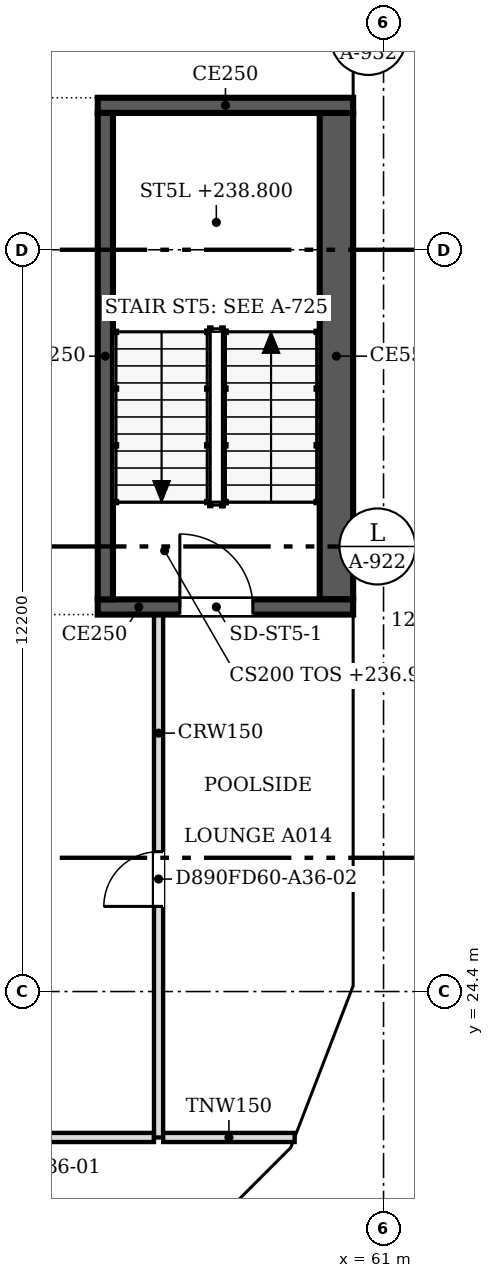
"""IFC4 building model, lengths in metres.
Left out: names, types, materials, properties, quantities, classifications, styles, units other than length and angle.
Written with IfcOpenShell. Run it as: python <this file> out.ifc"""

import sys

from ifc_helpers import new_model, si_unit, direction, frame, frame_2d, origin, place, context, subcontext, project, spatial, polyline, rectangle, outline, extrude, faceted_brep, source, transform, mapped, element, fill, save


model = new_model("IFC4")
c1 = context("Model", 3, precision=1e-05, world=origin(), true_north=direction((0.0, 1.0)))
c2 = subcontext(c1, "Body", "Model", "MODEL_VIEW")
j1 = project(units=[si_unit("LENGTHUNIT", "METRE"), si_unit("PLANEANGLEUNIT", "RADIAN")], contexts=[c1])
p1 = place(None, origin())
s1 = spatial("IfcSite", under=j1, at=p1, CompositionType="ELEMENT")
p2 = place(p1, origin())
s2 = spatial("IfcBuilding", under=s1, at=p2, CompositionType="ELEMENT")
p3 = place(p2, frame((0.0, 0.0, 236.9)))
s3 = spatial("IfcBuildingStorey", under=s2, at=p3, CompositionType="ELEMENT", Elevation=236.9)
m1 = source(origin(), c2, "Body", "Brep", [
    faceted_brep([(2.997, -0.25, 3.732), (2.944, -0.25, 3.8), (0.0, -0.25, 0.0), (2.997, -0.25, 0.0), (0.053, 0.25, 0.068), (2.891, 0.25, 3.732), (2.891, 0.25, 0.0), (0.053, 0.25, 0.0), (2.944, 0.0, 3.8), (0.0, 0.0, 0.0)], [[[0, 1, 2, 3]], [[4, 5, 6, 7]], [[8, 1, 0]], [[5, 4, 9, 2, 1, 8]], [[7, 6, 3, 2, 9]], [[7, 9, 4]], [[3, 6, 5, 8, 0]]]),
])
p4 = place(p3, frame((57.606, 19.612, 0.0), z_axis=(0.0, 0.0, 1.0), x_axis=(0.707106781187, 0.707106781187, 0.0)))
e1 = element("IfcWall", 1, at=p4, inside=s3, PredefinedType="SOLIDWALL", context=c2, shape_type="MappedRepresentation", body=[
    mapped(m1, transform((0.0, 0.0, 0.0), scale=1.0)),
])
m2 = source(origin(), c2, "Body", "SweptSolid", [
    extrude(outline(polyline([(2.744, 3.134), (0.51, 0.25), (2.744, 0.25), (2.744, 3.134)])), frame((0.0, 0.26, 0.0), z_axis=(0.0, -1.0, 0.0), x_axis=(1.0, 0.0, 0.0)), (0.0, 0.0, 1.0), 0.52),
])
p5 = place(p4, origin())
e2 = element("IfcOpeningElement", 2, at=p5, cuts=e1, PredefinedType="OPENING", context=c2, shape_type="MappedRepresentation", body=[
    mapped(m2, transform((0.0, 0.0, 0.0), scale=1.0)),
])
m3 = source(origin(), c2, "Body", "Brep", [
    faceted_brep([(3.003, -0.25, 0.0), (0.053, -0.25, 3.8), (0.0, -0.25, 3.732), (0.0, -0.25, 0.0), (0.106, 0.25, 3.732), (2.957, 0.25, 0.06), (2.957, 0.25, 0.0), (0.106, 0.25, 0.0), (0.053, 0.0, 3.8), (3.003, 0.0, 0.0)], [[[0, 1, 2, 3]], [[4, 5, 6, 7]], [[5, 4, 8, 1, 0, 9]], [[2, 1, 8]], [[7, 6, 9, 0, 3]], [[7, 3, 2, 8, 4]], [[9, 6, 5]]]),
])
p6 = place(p3, frame((59.669, 21.644, 0.0), z_axis=(0.0, 0.0, 1.0), x_axis=(0.35992665181, 0.932980602862, 0.0)))
e3 = element("IfcWall", 3, at=p6, inside=s3, PredefinedType="SOLIDWALL", context=c2, shape_type="MappedRepresentation", body=[
    mapped(m3, transform((0.0, 0.0, 0.0), scale=1.0)),
])
m4 = source(origin(), c2, "Body", "SweptSolid", [
    extrude(outline(polyline([(2.493, 0.25), (0.253, 3.135), (0.253, 0.25), (2.493, 0.25)])), frame((0.0, 0.26, 0.0), z_axis=(0.0, -1.0, 0.0), x_axis=(1.0, 0.0, 0.0)), (0.0, 0.0, 1.0), 0.52),
])
p7 = place(p6, origin())
e4 = element("IfcOpeningElement", 4, at=p7, cuts=e3, PredefinedType="OPENING", context=c2, shape_type="MappedRepresentation", body=[
    mapped(m4, transform((0.0, 0.0, 0.0), scale=1.0)),
])
m5 = source(origin(), c2, "Body", "Brep", [
    faceted_brep([(6.053, -0.25, 0.0), (3.003, -0.25, 3.8), (0.0, -0.25, 0.0), (0.047, 0.25, 0.059), (3.003, 0.25, 3.8), (6.053, 0.25, 0.0), (0.047, 0.25, 0.0), (0.0, 0.0, 0.0)], [[[0, 1, 2]], [[3, 4, 5, 6]], [[5, 4, 1, 0]], [[4, 3, 7, 2, 1]], [[6, 5, 0, 2, 7]], [[6, 7, 3]]]),
])
p8 = place(p3, frame((60.75, 24.447, 0.0), z_axis=(0.0, 0.0, 1.0), x_axis=(0.0, 1.0, 0.0)))
e5 = element("IfcWall", 5, at=p8, inside=s3, PredefinedType="SOLIDWALL", context=c2, shape_type="MappedRepresentation", body=[
    mapped(m5, transform((0.0, 0.0, 0.0), scale=1.0)),
])
m6 = source(origin(), c2, "Body", "SweptSolid", [
    extrude(outline(polyline([(5.532, 0.25), (3.005, 3.399), (0.516, 0.25), (5.532, 0.25)])), frame((0.0, 0.26, 0.0), z_axis=(0.0, -1.0, 0.0), x_axis=(1.0, 0.0, 0.0)), (0.0, 0.0, 1.0), 0.52),
])
p9 = place(p8, origin())
e6 = element("IfcOpeningElement", 6, at=p9, cuts=e5, PredefinedType="OPENING", context=c2, shape_type="MappedRepresentation", body=[
    mapped(m6, transform((0.0, 0.0, 0.0), scale=1.0)),
])
m7 = source(origin(), c2, "Body", "SweptSolid", [
    extrude(outline(polyline([(6.1, 0.0), (3.05, 3.8), (0.0, 0.0), (6.1, 0.0)])), frame((0.0, 0.25, 0.0), z_axis=(0.0, -1.0, 0.0), x_axis=(1.0, 0.0, 0.0)), (0.0, 0.0, 1.0), 0.5),
])
p10 = place(p3, frame((60.75, 30.5, 0.0), z_axis=(0.0, 0.0, 1.0), x_axis=(0.0, 1.0, 0.0)))
e7 = element("IfcWall", 7, at=p10, inside=s3, PredefinedType="SOLIDWALL", context=c2, shape_type="MappedRepresentation", body=[
    mapped(m7, transform((0.0, 0.0, 0.0), scale=1.0)),
])
m8 = source(origin(), c2, "Body", "SweptSolid", [
    extrude(outline(polyline([(5.579, 0.25), (3.05, 3.401), (0.521, 0.25), (5.579, 0.25)])), frame((0.0, 0.26, 0.0), z_axis=(0.0, -1.0, 0.0), x_axis=(1.0, 0.0, 0.0)), (0.0, 0.0, 1.0), 0.52),
])
p11 = place(p10, origin())
e8 = element("IfcOpeningElement", 8, at=p11, cuts=e7, PredefinedType="OPENING", context=c2, shape_type="MappedRepresentation", body=[
    mapped(m8, transform((0.0, 0.0, 0.0), scale=1.0)),
])
m9 = source(origin(), c2, "Body", "Brep", [
    faceted_brep([(6.1, -0.25, 0.0), (3.05, -0.25, 3.8), (0.0, -0.25, 0.0), (6.1, -0.25, 0.0), (0.0, 0.25, 0.0), (3.05, 0.25, 3.8), (6.1, 0.25, 0.0), (6.1, 0.25, 0.0)], [[[0, 1, 2, 3]], [[4, 5, 6, 7]], [[6, 5, 1, 0]], [[5, 4, 2, 1]], [[4, 7, 3, 2]], [[3, 7, 6, 0]]]),
])
p12 = place(p3, frame((60.75, 36.6, 0.0), z_axis=(0.0, 0.0, 1.0), x_axis=(0.0, 1.0, 0.0)))
e9 = element("IfcWall", 9, at=p12, inside=s3, PredefinedType="SOLIDWALL", context=c2, shape_type="MappedRepresentation", body=[
    mapped(m9, transform((0.0, 0.0, 0.0), scale=1.0)),
])
p13 = place(p12, origin())
e10 = element("IfcOpeningElement", 10, at=p13, cuts=e9, PredefinedType="OPENING", context=c2, shape_type="MappedRepresentation", body=[
    mapped(m8, transform((0.0, 0.0, 0.0), scale=1.0)),
])
p14 = place(p2, frame((0.0, 0.0, 240.7)))
s4 = spatial("IfcBuildingStorey", under=s2, at=p14, CompositionType="ELEMENT", Elevation=240.7)
m10 = source(origin(), c2, "Body", "Brep", [
    faceted_brep([(0.053, -0.25, 0.0), (2.997, -0.25, 3.8), (0.053, -0.25, 7.6), (0.0, -0.25, 7.532), (0.0, -0.25, 0.068), (0.106, 0.25, 7.532), (2.944, 0.25, 3.868), (2.944, 0.25, 3.732), (0.106, 0.25, 0.068), (2.997, 0.0, 3.8), (0.053, 0.0, 0.0), (0.053, 0.0, 7.6)], [[[0, 1, 2, 3, 4]], [[5, 6, 7, 8]], [[8, 7, 9, 1, 0, 10]], [[6, 5, 11, 2, 1, 9]], [[3, 2, 11]], [[10, 0, 4]], [[8, 10, 4, 3, 11, 5]], [[9, 7, 6]]]),
])
p15 = place(p14, frame((57.569, 19.574, -3.8), z_axis=(0.0, 0.0, 1.0), x_axis=(0.707106781187, 0.707106781187, 0.0)))
e11 = element("IfcWall", 11, at=p15, inside=s4, PredefinedType="SOLIDWALL", context=c2, shape_type="MappedRepresentation", body=[
    mapped(m10, transform((0.0, 0.0, 0.0), scale=1.0)),
])
m11 = source(origin(), c2, "Body", "SweptSolid", [
    extrude(outline(polyline([(0.253, 0.667), (2.681, 3.8), (0.253, 6.934), (0.253, 0.667)])), frame((0.0, 0.26, 0.0), z_axis=(0.0, -1.0, 0.0), x_axis=(1.0, 0.0, 0.0)), (0.0, 0.0, 1.0), 0.52),
])
p16 = place(p15, origin())
e12 = element("IfcOpeningElement", 12, at=p16, cuts=e11, PredefinedType="OPENING", context=c2, shape_type="MappedRepresentation", body=[
    mapped(m11, transform((0.0, 0.0, 0.0), scale=1.0)),
])
m12 = source(origin(), c2, "Body", "Brep", [
    faceted_brep([(2.95, -0.25, 0.0), (2.997, -0.25, 0.059), (2.997, -0.25, 7.541), (2.95, -0.25, 7.6), (0.0, -0.25, 3.8), (0.053, 0.25, 3.868), (2.904, 0.25, 7.54), (2.904, 0.25, 0.06), (0.053, 0.25, 3.732), (2.95, 0.0, 0.0), (2.95, 0.0, 7.6), (0.0, 0.0, 3.8)], [[[0, 1, 2, 3, 4]], [[5, 6, 7, 8]], [[1, 0, 9]], [[10, 3, 2]], [[6, 5, 11, 4, 3, 10]], [[8, 7, 9, 0, 4, 11]], [[8, 11, 5]], [[1, 9, 7, 6, 10, 2]]]),
])
p17 = place(p14, frame((59.688, 21.694, -3.8), z_axis=(0.0, 0.0, 1.0), x_axis=(0.359972353723, 0.932962970624, 0.0)))
e13 = element("IfcWall", 13, at=p17, inside=s4, PredefinedType="SOLIDWALL", context=c2, shape_type="MappedRepresentation", body=[
    mapped(m12, transform((0.0, 0.0, 0.0), scale=1.0)),
])
m13 = source(origin(), c2, "Body", "SweptSolid", [
    extrude(outline(polyline([(2.75, 6.935), (0.316, 3.8), (2.75, 0.665), (2.75, 6.935)])), frame((0.0, 0.26, 0.0), z_axis=(0.0, -1.0, 0.0), x_axis=(1.0, 0.0, 0.0)), (0.0, 0.0, 1.0), 0.52),
])
p18 = place(p17, origin())
e14 = element("IfcOpeningElement", 14, at=p18, cuts=e13, PredefinedType="OPENING", context=c2, shape_type="MappedRepresentation", body=[
    mapped(m13, transform((0.0, 0.0, 0.0), scale=1.0)),
])
m14 = source(origin(), c2, "Body", "Brep", [
    faceted_brep([(0.047, -0.25, 0.0), (3.05, -0.25, 3.8), (0.047, -0.25, 7.6), (0.0, -0.25, 7.54), (0.0, -0.25, 0.06), (0.093, 0.25, 7.541), (3.05, 0.25, 3.8), (0.093, 0.25, 0.059), (0.047, 0.0, 0.0), (0.047, 0.0, 7.6)], [[[0, 1, 2, 3, 4]], [[5, 6, 7]], [[7, 6, 1, 0, 8]], [[6, 5, 9, 2, 1]], [[3, 2, 9]], [[8, 0, 4]], [[7, 8, 4, 3, 9, 5]]]),
])
p19 = place(p14, frame((60.75, 24.4, -3.8), z_axis=(0.0, 0.0, 1.0), x_axis=(0.0, 1.0, 0.0)))
e15 = element("IfcWall", 15, at=p19, inside=s4, PredefinedType="SOLIDWALL", context=c2, shape_type="MappedRepresentation", body=[
    mapped(m14, transform((0.0, 0.0, 0.0), scale=1.0)),
])
m15 = source(origin(), c2, "Body", "SweptSolid", [
    extrude(outline(polyline([(0.247, 0.656), (2.731, 3.8), (0.247, 6.944), (0.247, 0.656)])), frame((0.0, 0.26, 0.0), z_axis=(0.0, -1.0, 0.0), x_axis=(1.0, 0.0, 0.0)), (0.0, 0.0, 1.0), 0.52),
])
p20 = place(p19, origin())
e16 = element("IfcOpeningElement", 16, at=p20, cuts=e15, PredefinedType="OPENING", context=c2, shape_type="MappedRepresentation", body=[
    mapped(m15, transform((0.0, 0.0, 0.0), scale=1.0)),
])
m16 = source(origin(), c2, "Body", "SweptSolid", [
    extrude(outline(polyline([(3.05, 0.0), (6.1, 3.8), (3.05, 7.6), (0.0, 3.8), (3.05, 0.0)])), frame((0.0, 0.25, 0.0), z_axis=(0.0, -1.0, 0.0), x_axis=(1.0, 0.0, 0.0)), (0.0, 0.0, 1.0), 0.5),
])
p21 = place(p14, frame((60.75, 27.45, -3.8), z_axis=(0.0, 0.0, 1.0), x_axis=(0.0, 1.0, 0.0)))
e17 = element("IfcWall", 17, at=p21, inside=s4, PredefinedType="SOLIDWALL", context=c2, shape_type="MappedRepresentation", body=[
    mapped(m16, transform((0.0, 0.0, 0.0), scale=1.0)),
])
m17 = source(origin(), c2, "Body", "SweptSolid", [
    extrude(outline(polyline([(3.05, 0.399), (5.78, 3.8), (3.05, 7.201), (0.321, 3.8), (3.05, 0.399)])), frame((0.0, 0.26, 0.0), z_axis=(0.0, -1.0, 0.0), x_axis=(1.0, 0.0, 0.0)), (0.0, 0.0, 1.0), 0.52),
])
p22 = place(p21, origin())
e18 = element("IfcOpeningElement", 18, at=p22, cuts=e17, PredefinedType="OPENING", context=c2, shape_type="MappedRepresentation", body=[
    mapped(m17, transform((0.0, 0.0, 0.0), scale=1.0)),
])
m18 = source(origin(), c2, "Body", "Brep", [
    faceted_brep([(3.05, -0.25, 0.0), (6.1, -0.25, 3.8), (6.1, -0.25, 3.8), (3.05, -0.25, 7.6), (0.0, -0.25, 3.8), (0.0, 0.25, 3.8), (3.05, 0.25, 7.6), (6.1, 0.25, 3.8), (6.1, 0.25, 3.8), (3.05, 0.25, 0.0)], [[[0, 1, 2, 3, 4]], [[5, 6, 7, 8, 9]], [[9, 8, 1, 0]], [[7, 6, 3, 2]], [[6, 5, 4, 3]], [[5, 9, 0, 4]], [[1, 8, 7, 2]]]),
])
p23 = place(p14, frame((60.75, 33.55, -3.8), z_axis=(0.0, 0.0, 1.0), x_axis=(0.0, 1.0, 0.0)))
e19 = element("IfcWall", 19, at=p23, inside=s4, PredefinedType="SOLIDWALL", context=c2, shape_type="MappedRepresentation", body=[
    mapped(m18, transform((0.0, 0.0, 0.0), scale=1.0)),
])
p24 = place(p23, origin())
e20 = element("IfcOpeningElement", 20, at=p24, cuts=e19, PredefinedType="OPENING", context=c2, shape_type="MappedRepresentation", body=[
    mapped(m17, transform((0.0, 0.0, 0.0), scale=1.0)),
])
p25 = place(p14, frame((60.75, 39.65, -3.8), z_axis=(0.0, 0.0, 1.0), x_axis=(0.0, 1.0, 0.0)))
e21 = element("IfcWall", 21, at=p25, inside=s4, PredefinedType="SOLIDWALL", context=c2, shape_type="MappedRepresentation", body=[
    mapped(m16, transform((0.0, 0.0, 0.0), scale=1.0)),
])
p26 = place(p25, origin())
e22 = element("IfcOpeningElement", 22, at=p26, cuts=e21, PredefinedType="OPENING", context=c2, shape_type="MappedRepresentation", body=[
    mapped(m17, transform((0.0, 0.0, 0.0), scale=1.0)),
])
p27 = place(p3, frame((60.5, 30.725, 0.0), z_axis=(0.0, 0.0, 1.0), x_axis=(-1.0, 0.0, 0.0)))
e23 = element("IfcWall", 23, at=p27, inside=s3, PredefinedType="SOLIDWALL", context=c2, shape_type="SweptSolid", body=[
    extrude(rectangle(XDim=4.2, YDim=0.25, at=frame_2d((2.1, 0.0))), origin(), (0.0, 0.0, 1.0), 3.8),
])
m19 = source(origin(), c2, "Body", "SweptSolid", [
    extrude(rectangle(XDim=1.2, YDim=2.1, at=frame_2d((0.6, 1.05))), frame((0.0, 0.135, 0.0), z_axis=(0.0, -1.0, 0.0), x_axis=(1.0, 0.0, 0.0)), (0.0, 0.0, 1.0), 0.27),
])
p28 = place(p27, frame((1.65, 0.0, 0.0)))
e24 = element("IfcOpeningElement", 24, at=p28, cuts=e23, PredefinedType="OPENING", context=c2, shape_type="MappedRepresentation", body=[
    mapped(m19, transform((0.0, 0.0, 0.0), scale=1.0)),
])
p29 = place(p3, frame((56.425, 30.85, 0.0), z_axis=(0.0, 0.0, 1.0), x_axis=(0.0, 1.0, 0.0)))
e25 = element("IfcWall", 25, at=p29, inside=s3, PredefinedType="SOLIDWALL", context=c2, shape_type="SweptSolid", body=[
    extrude(rectangle(XDim=8.0, YDim=0.25, at=frame_2d((4.0, 0.0))), origin(), (0.0, 0.0, 1.0), 3.8),
])
p30 = place(p3, frame((56.3, 38.975, 0.0), z_axis=(0.0, 0.0, 1.0), x_axis=(1.0, 0.0, 0.0)))
e26 = element("IfcWall", 26, at=p30, inside=s3, PredefinedType="SOLIDWALL", context=c2, shape_type="SweptSolid", body=[
    extrude(rectangle(XDim=4.2, YDim=0.25, at=frame_2d((2.1, 0.0))), origin(), (0.0, 0.0, 1.0), 3.8),
])
p31 = place(p3, frame((60.225, 38.85, 0.0), z_axis=(0.0, 0.0, 1.0), x_axis=(0.0, -1.0, 0.0)))
e27 = element("IfcWall", 27, at=p31, inside=s3, PredefinedType="SOLIDWALL", context=c2, shape_type="SweptSolid", body=[
    extrude(rectangle(XDim=8.0, YDim=0.55, at=frame_2d((4.0, 0.0))), origin(), (0.0, 0.0, 1.0), 3.8),
])
p32 = place(p3, frame((57.224, 22.0, 0.0), z_axis=(0.0, 0.0, 1.0), x_axis=(-1.0, 0.0, 0.0)))
e28 = element("IfcWall", 28, at=p32, inside=s3, PredefinedType="PARTITIONING", context=c2, shape_type="SweptSolid", body=[
    extrude(rectangle(XDim=29.124, YDim=0.15, at=frame_2d((14.562, 0.0))), origin(), (0.0, 0.0, 1.0), 3.067),
])
m20 = source(origin(), c2, "Body", "SweptSolid", [
    extrude(rectangle(XDim=0.9, YDim=2.1, at=frame_2d((0.45, 1.05))), frame((0.0, 0.085, 0.0), z_axis=(0.0, -1.0, 0.0), x_axis=(1.0, 0.0, 0.0)), (0.0, 0.0, 1.0), 0.17),
])
p33 = place(p32, frame((1.923, 0.0, 0.0)))
e29 = element("IfcOpeningElement", 29, at=p33, cuts=e28, PredefinedType="OPENING", context=c2, shape_type="MappedRepresentation", body=[
    mapped(m20, transform((0.0, 0.0, 0.0), scale=1.0)),
])
p34 = place(p32, frame((22.624, 0.0, 0.0)))
e30 = element("IfcOpeningElement", 30, at=p34, cuts=e28, PredefinedType="OPENING", context=c2, shape_type="MappedRepresentation", body=[
    mapped(m20, transform((0.0, 0.0, 0.0), scale=1.0)),
])
p35 = place(p32, frame((10.424, 0.0, 0.0)))
e31 = element("IfcOpeningElement", 31, at=p35, cuts=e28, PredefinedType="OPENING", context=c2, shape_type="MappedRepresentation", body=[
    mapped(m20, transform((0.0, 0.0, 0.0), scale=1.0)),
])
p36 = place(p3, frame((57.3, 30.6, 0.0), z_axis=(0.0, 0.0, 1.0), x_axis=(0.0, -1.0, 0.0)))
e32 = element("IfcWall", 32, at=p36, inside=s3, PredefinedType="PARTITIONING", context=c2, shape_type="SweptSolid", body=[
    extrude(rectangle(XDim=8.6, YDim=0.15, at=frame_2d((4.3, 0.0))), origin(), (0.0, 0.0, 1.0), 3.067),
])
p37 = place(p36, frame((3.9, 0.0, 0.0)))
e33 = element("IfcOpeningElement", 33, at=p37, cuts=e32, PredefinedType="OPENING", context=c2, shape_type="MappedRepresentation", body=[
    mapped(m20, transform((0.0, 0.0, 0.0), scale=1.0)),
])
p38 = place(p3, frame((57.376, 22.0, 0.0), z_axis=(0.0, 0.0, 1.0), x_axis=(1.0, 0.0, 0.0)))
e34 = element("IfcWall", 34, at=p38, inside=s3, PredefinedType="PARTITIONING", context=c2, shape_type="SweptSolid", body=[
    extrude(rectangle(XDim=2.162, YDim=0.15, at=frame_2d((1.081, 0.0))), origin(), (0.0, 0.0, 1.0), 3.067),
])
m21 = source(origin(), c2, "Body", "SweptSolid", [
    extrude(rectangle(XDim=1.2, YDim=2.1, at=frame_2d((0.6, 1.05))), frame((0.0, 0.025, 0.0), z_axis=(0.0, -1.0, 0.0), x_axis=(1.0, 0.0, 0.0)), (0.0, 0.0, 1.0), 0.05),
])
p39 = place(p28, origin())
e35 = element("IfcDoor", 35, at=p39, inside=s3, OperationType="SINGLE_SWING_RIGHT", PredefinedType="DOOR", context=c2, shape_type="MappedRepresentation", body=[
    mapped(m21, transform((0.0, 0.0, 0.0), scale=1.0)),
])
fill(e24, e35)
m22 = source(origin(), c2, "Body", "SweptSolid", [
    extrude(rectangle(XDim=0.9, YDim=2.1, at=frame_2d((0.45, 1.05))), frame((0.0, 0.025, 0.0), z_axis=(0.0, -1.0, 0.0), x_axis=(1.0, 0.0, 0.0)), (0.0, 0.0, 1.0), 0.05),
])
p40 = place(p37, origin())
e36 = element("IfcDoor", 36, at=p40, inside=s3, OperationType="SINGLE_SWING_RIGHT", PredefinedType="DOOR", context=c2, shape_type="MappedRepresentation", body=[
    mapped(m22, transform((0.0, 0.0, 0.0), scale=1.0)),
])
fill(e33, e36)
save(model, sys.argv[1])
